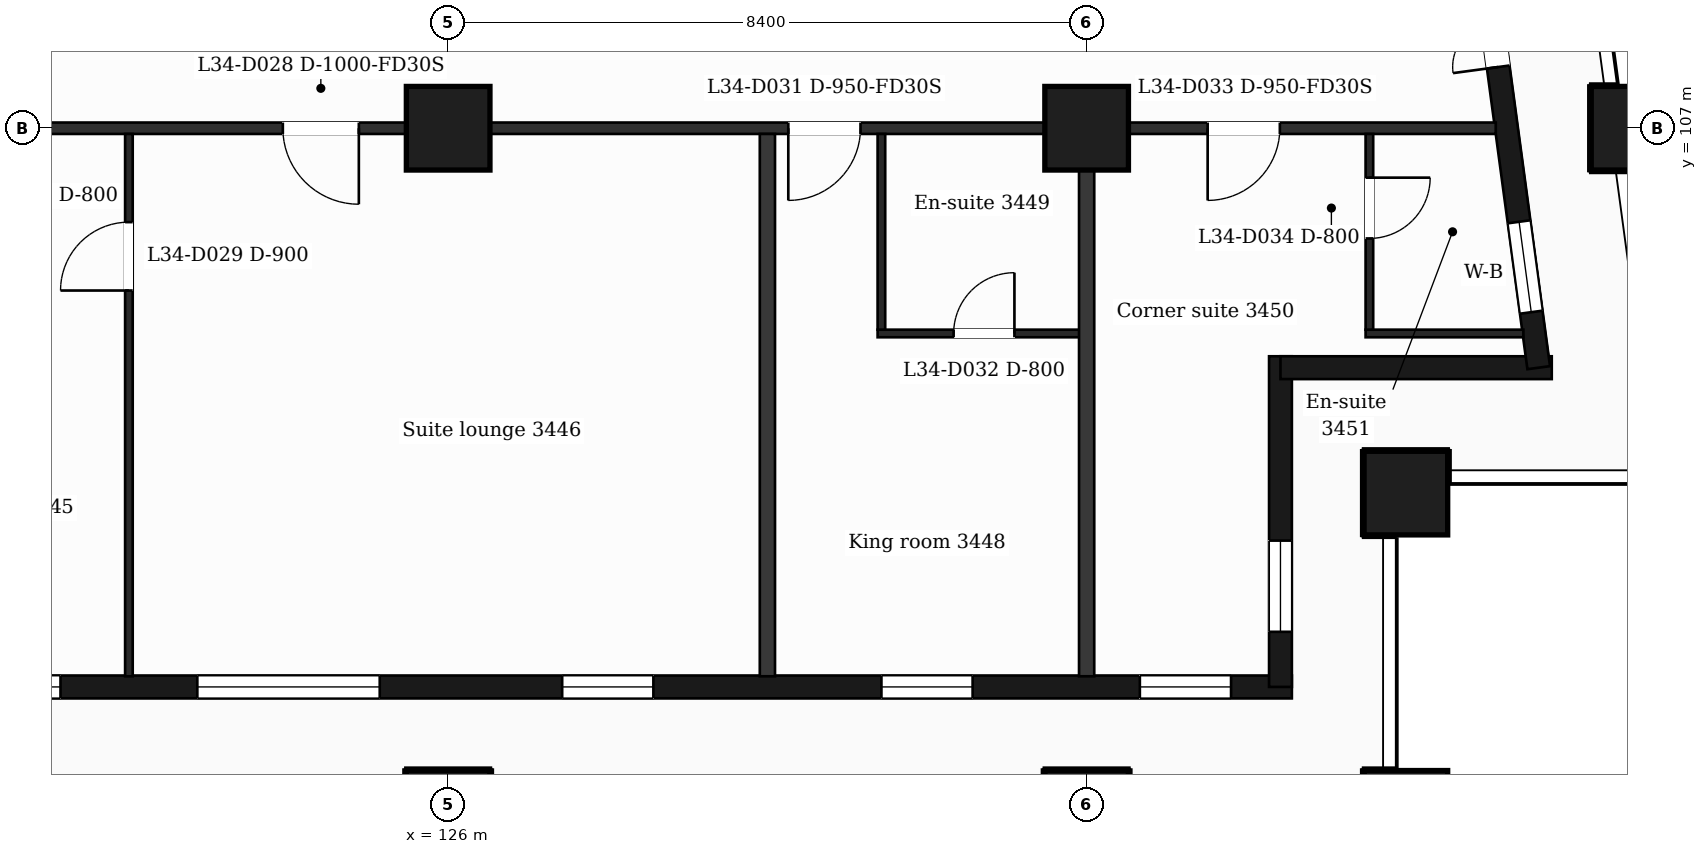
"""IFC4 building model, lengths in metres.
Left out: names, types, materials, properties, quantities, classifications, styles, units other than length and angle.
Written with IfcOpenShell. Run it as: python <this file> out.ifc"""

import sys

from ifc_helpers import new_model, si_unit, direction, frame, frame_2d, origin, origin_2d, place, context, subcontext, project, spatial, rectangle, extrude, element, fill, save


model = new_model("IFC4")
c1 = context("Model", 3, precision=1e-05, world=origin(), true_north=direction((0.0, 1.0)))
c2 = subcontext(c1, "Body", "Model", "MODEL_VIEW")
j1 = project(units=[si_unit("LENGTHUNIT", "METRE"), si_unit("PLANEANGLEUNIT", "RADIAN")], contexts=[c1])
p1 = place(None, origin())
s1 = spatial("IfcSite", under=j1, at=p1, CompositionType="ELEMENT")
p2 = place(p1, origin())
s2 = spatial("IfcBuilding", under=s1, at=p2, CompositionType="ELEMENT")
p3 = place(p2, frame((0.0, 0.0, 147.8)))
s3 = spatial("IfcBuildingStorey", under=s2, at=p3, CompositionType="ELEMENT", Elevation=147.8)
for number, where, z_axis, x_axis in (
    (1, (126.0, 98.0, 0.0), (0.0, 0.0, 1.0), (1.0, 0.0, 0.0)),
    (2, (134.4, 98.0, 0.0), (0.0, 0.0, 1.0), (1.0, 0.0, 0.0)),
    (3, (138.6, 98.0, 0.0), (0.0, 0.0, 1.0), (1.0, 0.0, 0.0)),
    (4, (138.6, 102.2, 0.0), (0.0, 0.0, 1.0), (1.0, 0.0, 0.0)),
    (5, (126.0, 107.0, 0.0), (0.0, 0.0, 1.0), (1.0, 0.0, 0.0)),
    (6, (134.4, 107.0, 0.0), (0.0, 0.0, 1.0), (1.0, 0.0, 0.0)),
    (7, (141.588, 107.0, 0.0), (0.0, 0.0, 1.0), (1.0, 0.0, 0.0)),
):
    element("IfcColumn", number, at=place(p3, frame(where, z_axis=z_axis, x_axis=x_axis)), inside=s3, PredefinedType="COLUMN", context=c2, shape_type="SweptSolid", body=[
        extrude(rectangle(XDim=1.1, YDim=1.1, at=origin_2d()), origin(), (0.0, 0.0, 1.0), 3.7),
    ])
p4 = place(p3, frame((89.85, 99.65, 0.0), z_axis=(0.0, 0.0, 1.0), x_axis=(1.0, 0.0, 0.0)))
e8 = element("IfcWall", 8, at=p4, inside=s3, PredefinedType="SOLIDWALL", context=c2, shape_type="SweptSolid", body=[
    extrude(rectangle(XDim=47.25, YDim=0.3, at=frame_2d((23.625, 0.0))), origin(), (0.0, 0.0, 1.0), 3.38),
])
p5 = place(p4, frame((0.725, 0.0, 0.9)))
e9 = element("IfcOpeningElement", 9, at=p5, cuts=e8, PredefinedType="OPENING", context=c2, shape_type="SweptSolid", body=[
    extrude(rectangle(XDim=1.2, YDim=2.1, at=frame_2d((0.6, 1.05))), frame((0.0, 0.16, 0.0), z_axis=(0.0, -1.0, 0.0), x_axis=(1.0, 0.0, 0.0)), (0.0, 0.0, 1.0), 0.32),
])
p6 = place(p4, frame((3.45, 0.0, 0.9)))
e10 = element("IfcOpeningElement", 10, at=p6, cuts=e8, PredefinedType="OPENING", context=c2, shape_type="SweptSolid", body=[
    extrude(rectangle(XDim=2.4, YDim=2.1, at=frame_2d((1.2, 1.05))), frame((0.0, 0.16, 0.0), z_axis=(0.0, -1.0, 0.0), x_axis=(1.0, 0.0, 0.0)), (0.0, 0.0, 1.0), 0.32),
])
p7 = place(p4, frame((8.25, 0.0, 0.9)))
e11 = element("IfcOpeningElement", 11, at=p7, cuts=e8, PredefinedType="OPENING", context=c2, shape_type="SweptSolid", body=[
    extrude(rectangle(XDim=1.2, YDim=2.1, at=frame_2d((0.6, 1.05))), frame((0.0, 0.16, 0.0), z_axis=(0.0, -1.0, 0.0), x_axis=(1.0, 0.0, 0.0)), (0.0, 0.0, 1.0), 0.32),
])
p8 = place(p4, frame((12.45, 0.0, 0.9)))
e12 = element("IfcOpeningElement", 12, at=p8, cuts=e8, PredefinedType="OPENING", context=c2, shape_type="SweptSolid", body=[
    extrude(rectangle(XDim=1.2, YDim=2.1, at=frame_2d((0.6, 1.05))), frame((0.0, 0.16, 0.0), z_axis=(0.0, -1.0, 0.0), x_axis=(1.0, 0.0, 0.0)), (0.0, 0.0, 1.0), 0.32),
])
p9 = place(p4, frame((16.05, 0.0, 0.9)))
e13 = element("IfcOpeningElement", 13, at=p9, cuts=e8, PredefinedType="OPENING", context=c2, shape_type="SweptSolid", body=[
    extrude(rectangle(XDim=2.4, YDim=2.1, at=frame_2d((1.2, 1.05))), frame((0.0, 0.16, 0.0), z_axis=(0.0, -1.0, 0.0), x_axis=(1.0, 0.0, 0.0)), (0.0, 0.0, 1.0), 0.32),
])
p10 = place(p4, frame((20.25, 0.0, 0.9)))
e14 = element("IfcOpeningElement", 14, at=p10, cuts=e8, PredefinedType="OPENING", context=c2, shape_type="SweptSolid", body=[
    extrude(rectangle(XDim=2.4, YDim=2.1, at=frame_2d((1.2, 1.05))), frame((0.0, 0.16, 0.0), z_axis=(0.0, -1.0, 0.0), x_axis=(1.0, 0.0, 0.0)), (0.0, 0.0, 1.0), 0.32),
])
p11 = place(p4, frame((25.05, 0.0, 0.0)))
e15 = element("IfcOpeningElement", 15, at=p11, cuts=e8, PredefinedType="OPENING", context=c2, shape_type="SweptSolid", body=[
    extrude(rectangle(XDim=1.2, YDim=2.4, at=frame_2d((0.6, 1.2))), frame((0.0, 0.16, 0.0), z_axis=(0.0, -1.0, 0.0), x_axis=(1.0, 0.0, 0.0)), (0.0, 0.0, 1.0), 0.32),
])
p12 = place(p4, frame((28.65, 0.0, 0.9)))
e16 = element("IfcOpeningElement", 16, at=p12, cuts=e8, PredefinedType="OPENING", context=c2, shape_type="SweptSolid", body=[
    extrude(rectangle(XDim=2.4, YDim=2.1, at=frame_2d((1.2, 1.05))), frame((0.0, 0.16, 0.0), z_axis=(0.0, -1.0, 0.0), x_axis=(1.0, 0.0, 0.0)), (0.0, 0.0, 1.0), 0.32),
])
p13 = place(p4, frame((32.85, 0.0, 0.9)))
e17 = element("IfcOpeningElement", 17, at=p13, cuts=e8, PredefinedType="OPENING", context=c2, shape_type="SweptSolid", body=[
    extrude(rectangle(XDim=2.4, YDim=2.1, at=frame_2d((1.2, 1.05))), frame((0.0, 0.16, 0.0), z_axis=(0.0, -1.0, 0.0), x_axis=(1.0, 0.0, 0.0)), (0.0, 0.0, 1.0), 0.32),
])
p14 = place(p4, frame((37.65, 0.0, 0.9)))
e18 = element("IfcOpeningElement", 18, at=p14, cuts=e8, PredefinedType="OPENING", context=c2, shape_type="SweptSolid", body=[
    extrude(rectangle(XDim=1.2, YDim=2.1, at=frame_2d((0.6, 1.05))), frame((0.0, 0.16, 0.0), z_axis=(0.0, -1.0, 0.0), x_axis=(1.0, 0.0, 0.0)), (0.0, 0.0, 1.0), 0.32),
])
p15 = place(p4, frame((41.85, 0.0, 0.9)))
e19 = element("IfcOpeningElement", 19, at=p15, cuts=e8, PredefinedType="OPENING", context=c2, shape_type="SweptSolid", body=[
    extrude(rectangle(XDim=1.2, YDim=2.1, at=frame_2d((0.6, 1.05))), frame((0.0, 0.16, 0.0), z_axis=(0.0, -1.0, 0.0), x_axis=(1.0, 0.0, 0.0)), (0.0, 0.0, 1.0), 0.32),
])
p16 = place(p4, frame((45.25, 0.0, 0.9)))
e20 = element("IfcOpeningElement", 20, at=p16, cuts=e8, PredefinedType="OPENING", context=c2, shape_type="SweptSolid", body=[
    extrude(rectangle(XDim=1.2, YDim=2.1, at=frame_2d((0.6, 1.05))), frame((0.0, 0.16, 0.0), z_axis=(0.0, -1.0, 0.0), x_axis=(1.0, 0.0, 0.0)), (0.0, 0.0, 1.0), 0.32),
])
p17 = place(p3, frame((136.95, 99.65, 0.0), z_axis=(0.0, 0.0, 1.0), x_axis=(0.0, 1.0, 0.0)))
e21 = element("IfcWall", 21, at=p17, inside=s3, PredefinedType="SOLIDWALL", context=c2, shape_type="SweptSolid", body=[
    extrude(rectangle(XDim=4.35, YDim=0.3, at=frame_2d((2.175, 0.0))), origin(), (0.0, 0.0, 1.0), 3.38),
])
p18 = place(p17, frame((0.725, 0.0, 0.9)))
e22 = element("IfcOpeningElement", 22, at=p18, cuts=e21, PredefinedType="OPENING", context=c2, shape_type="SweptSolid", body=[
    extrude(rectangle(XDim=1.2, YDim=2.1, at=frame_2d((0.6, 1.05))), frame((0.0, 0.16, 0.0), z_axis=(0.0, -1.0, 0.0), x_axis=(1.0, 0.0, 0.0)), (0.0, 0.0, 1.0), 0.32),
])
p19 = place(p3, frame((136.95, 103.85, 0.0), z_axis=(0.0, 0.0, 1.0), x_axis=(1.0, 0.0, 0.0)))
e23 = element("IfcWall", 23, at=p19, inside=s3, PredefinedType="SOLIDWALL", context=c2, shape_type="SweptSolid", body=[
    extrude(rectangle(XDim=3.569, YDim=0.3, at=frame_2d((1.785, 0.0))), origin(), (0.0, 0.0, 1.0), 3.38),
])
p20 = place(p3, frame((140.348, 103.85, 0.0), z_axis=(0.0, 0.0, 1.0), x_axis=(-0.133431549479, 0.991058031401, 0.0)))
e24 = element("IfcWall", 24, at=p20, inside=s3, PredefinedType="SOLIDWALL", context=c2, shape_type="SweptSolid", body=[
    extrude(rectangle(XDim=6.609, YDim=0.3, at=frame_2d((3.304, 0.0))), origin(), (0.0, 0.0, 1.0), 3.38),
])
p21 = place(p20, frame((0.737, 0.0, 0.9)))
e25 = element("IfcOpeningElement", 25, at=p21, cuts=e24, PredefinedType="OPENING", context=c2, shape_type="SweptSolid", body=[
    extrude(rectangle(XDim=1.2, YDim=2.1, at=frame_2d((0.6, 1.05))), frame((0.0, 0.16, 0.0), z_axis=(0.0, -1.0, 0.0), x_axis=(1.0, 0.0, 0.0)), (0.0, 0.0, 1.0), 0.32),
])
p22 = place(p20, frame((3.991, 0.0, 0.0)))
e26 = element("IfcOpeningElement", 26, at=p22, cuts=e24, PredefinedType="OPENING", context=c2, shape_type="SweptSolid", body=[
    extrude(rectangle(XDim=1.2, YDim=2.4, at=frame_2d((0.6, 1.2))), frame((0.0, 0.16, 0.0), z_axis=(0.0, -1.0, 0.0), x_axis=(1.0, 0.0, 0.0)), (0.0, 0.0, 1.0), 0.32),
])
p23 = place(p3, frame((131.65, 104.3, 0.0), z_axis=(0.0, 0.0, 1.0), x_axis=(1.0, 0.0, 0.0)))
e27 = element("IfcWall", 27, at=p23, inside=s3, PredefinedType="PARTITIONING", context=c2, shape_type="SweptSolid", body=[
    extrude(rectangle(XDim=2.75, YDim=0.1, at=frame_2d((1.375, 0.0))), origin(), (0.0, 0.0, 1.0), 3.38),
])
p24 = place(p23, frame((1.0, 0.0, 0.0)))
e28 = element("IfcOpeningElement", 28, at=p24, cuts=e27, PredefinedType="OPENING", context=c2, shape_type="SweptSolid", body=[
    extrude(rectangle(XDim=0.8, YDim=2.1, at=frame_2d((0.4, 1.05))), frame((0.0, 0.06, 0.0), z_axis=(0.0, -1.0, 0.0), x_axis=(1.0, 0.0, 0.0)), (0.0, 0.0, 1.0), 0.12),
])
p25 = place(p3, frame((138.07, 104.3, 0.0), z_axis=(0.0, 0.0, 1.0), x_axis=(1.0, 0.0, 0.0)))
e29 = element("IfcWall", 29, at=p25, inside=s3, PredefinedType="PARTITIONING", context=c2, shape_type="SweptSolid", body=[
    extrude(rectangle(XDim=2.076, YDim=0.1, at=frame_2d((1.038, 0.0))), origin(), (0.0, 0.0, 1.0), 3.38),
])
p26 = place(p3, frame((87.018, 107.0, 0.0), z_axis=(0.0, 0.0, 1.0), x_axis=(1.0, 0.0, 0.0)))
e30 = element("IfcWall", 30, at=p26, inside=s3, PredefinedType="PARTITIONING", context=c2, shape_type="SweptSolid", body=[
    extrude(rectangle(XDim=52.765, YDim=0.15, at=frame_2d((26.382, 0.0))), origin(), (0.0, 0.0, 1.0), 3.38),
])
p27 = place(p26, frame((0.707, 0.0, 0.0)))
e31 = element("IfcOpeningElement", 31, at=p27, cuts=e30, PredefinedType="OPENING", context=c2, shape_type="SweptSolid", body=[
    extrude(rectangle(XDim=0.95, YDim=2.1, at=frame_2d((0.475, 1.05))), frame((0.0, 0.085, 0.0), z_axis=(0.0, -1.0, 0.0), x_axis=(1.0, 0.0, 0.0)), (0.0, 0.0, 1.0), 0.17),
])
p28 = place(p26, frame((7.645, 0.0, 0.0)))
e32 = element("IfcOpeningElement", 32, at=p28, cuts=e30, PredefinedType="OPENING", context=c2, shape_type="SweptSolid", body=[
    extrude(rectangle(XDim=0.95, YDim=2.1, at=frame_2d((0.475, 1.05))), frame((0.0, 0.085, 0.0), z_axis=(0.0, -1.0, 0.0), x_axis=(1.0, 0.0, 0.0)), (0.0, 0.0, 1.0), 0.17),
])
p29 = place(p26, frame((12.067, 0.0, 0.0)))
e33 = element("IfcOpeningElement", 33, at=p29, cuts=e30, PredefinedType="OPENING", context=c2, shape_type="SweptSolid", body=[
    extrude(rectangle(XDim=0.95, YDim=2.1, at=frame_2d((0.475, 1.05))), frame((0.0, 0.085, 0.0), z_axis=(0.0, -1.0, 0.0), x_axis=(1.0, 0.0, 0.0)), (0.0, 0.0, 1.0), 0.17),
])
p30 = place(p26, frame((14.582, 0.0, 0.0)))
e34 = element("IfcOpeningElement", 34, at=p30, cuts=e30, PredefinedType="OPENING", context=c2, shape_type="SweptSolid", body=[
    extrude(rectangle(XDim=0.95, YDim=2.1, at=frame_2d((0.475, 1.05))), frame((0.0, 0.085, 0.0), z_axis=(0.0, -1.0, 0.0), x_axis=(1.0, 0.0, 0.0)), (0.0, 0.0, 1.0), 0.17),
])
p31 = place(p26, frame((20.432, 0.0, 0.0)))
e35 = element("IfcOpeningElement", 35, at=p31, cuts=e30, PredefinedType="OPENING", context=c2, shape_type="SweptSolid", body=[
    extrude(rectangle(XDim=0.95, YDim=2.1, at=frame_2d((0.475, 1.05))), frame((0.0, 0.085, 0.0), z_axis=(0.0, -1.0, 0.0), x_axis=(1.0, 0.0, 0.0)), (0.0, 0.0, 1.0), 0.17),
])
p32 = place(p26, frame((23.532, 0.0, 0.0)))
e36 = element("IfcOpeningElement", 36, at=p32, cuts=e30, PredefinedType="OPENING", context=c2, shape_type="SweptSolid", body=[
    extrude(rectangle(XDim=1.0, YDim=2.1, at=frame_2d((0.5, 1.05))), frame((0.0, 0.085, 0.0), z_axis=(0.0, -1.0, 0.0), x_axis=(1.0, 0.0, 0.0)), (0.0, 0.0, 1.0), 0.17),
])
p33 = place(p26, frame((36.807, 0.0, 0.0)))
e37 = element("IfcOpeningElement", 37, at=p33, cuts=e30, PredefinedType="OPENING", context=c2, shape_type="SweptSolid", body=[
    extrude(rectangle(XDim=1.0, YDim=2.1, at=frame_2d((0.5, 1.05))), frame((0.0, 0.085, 0.0), z_axis=(0.0, -1.0, 0.0), x_axis=(1.0, 0.0, 0.0)), (0.0, 0.0, 1.0), 0.17),
])
p34 = place(p26, frame((43.457, 0.0, 0.0)))
e38 = element("IfcOpeningElement", 38, at=p34, cuts=e30, PredefinedType="OPENING", context=c2, shape_type="SweptSolid", body=[
    extrude(rectangle(XDim=0.95, YDim=2.1, at=frame_2d((0.475, 1.05))), frame((0.0, 0.085, 0.0), z_axis=(0.0, -1.0, 0.0), x_axis=(1.0, 0.0, 0.0)), (0.0, 0.0, 1.0), 0.17),
])
p35 = place(p26, frame((48.974, 0.0, 0.0)))
e39 = element("IfcOpeningElement", 39, at=p35, cuts=e30, PredefinedType="OPENING", context=c2, shape_type="SweptSolid", body=[
    extrude(rectangle(XDim=0.95, YDim=2.1, at=frame_2d((0.475, 1.05))), frame((0.0, 0.085, 0.0), z_axis=(0.0, -1.0, 0.0), x_axis=(1.0, 0.0, 0.0)), (0.0, 0.0, 1.0), 0.17),
])
p36 = place(p3, frame((121.8, 99.79, 0.0), z_axis=(0.0, 0.0, 1.0), x_axis=(0.0, 1.0, 0.0)))
e40 = element("IfcWall", 40, at=p36, inside=s3, PredefinedType="PARTITIONING", context=c2, shape_type="SweptSolid", body=[
    extrude(rectangle(XDim=7.135, YDim=0.1, at=frame_2d((3.567, 0.0))), origin(), (0.0, 0.0, 1.0), 3.38),
])
p37 = place(p36, frame((5.075, 0.0, 0.0)))
e41 = element("IfcOpeningElement", 41, at=p37, cuts=e40, PredefinedType="OPENING", context=c2, shape_type="SweptSolid", body=[
    extrude(rectangle(XDim=0.9, YDim=2.1, at=frame_2d((0.45, 1.05))), frame((0.0, 0.06, 0.0), z_axis=(0.0, -1.0, 0.0), x_axis=(1.0, 0.0, 0.0)), (0.0, 0.0, 1.0), 0.12),
])
p38 = place(p3, frame((130.2, 99.79, 0.0), z_axis=(0.0, 0.0, 1.0), x_axis=(0.0, 1.0, 0.0)))
e42 = element("IfcWall", 42, at=p38, inside=s3, PredefinedType="PARTITIONING", context=c2, shape_type="SweptSolid", body=[
    extrude(rectangle(XDim=7.135, YDim=0.2, at=frame_2d((3.567, 0.0))), origin(), (0.0, 0.0, 1.0), 3.38),
])
p39 = place(p3, frame((131.7, 104.35, 0.0), z_axis=(0.0, 0.0, 1.0), x_axis=(0.0, 1.0, 0.0)))
e43 = element("IfcWall", 43, at=p39, inside=s3, PredefinedType="PARTITIONING", context=c2, shape_type="SweptSolid", body=[
    extrude(rectangle(XDim=2.575, YDim=0.1, at=frame_2d((1.288, 0.0))), origin(), (0.0, 0.0, 1.0), 3.38),
])
p40 = place(p3, frame((134.4, 99.79, 0.0), z_axis=(0.0, 0.0, 1.0), x_axis=(0.0, 1.0, 0.0)))
e44 = element("IfcWall", 44, at=p40, inside=s3, PredefinedType="PARTITIONING", context=c2, shape_type="SweptSolid", body=[
    extrude(rectangle(XDim=7.135, YDim=0.2, at=frame_2d((3.567, 0.0))), origin(), (0.0, 0.0, 1.0), 3.38),
])
p41 = place(p3, frame((138.12, 104.35, 0.0), z_axis=(0.0, 0.0, 1.0), x_axis=(0.0, 1.0, 0.0)))
e45 = element("IfcWall", 45, at=p41, inside=s3, PredefinedType="PARTITIONING", context=c2, shape_type="SweptSolid", body=[
    extrude(rectangle(XDim=2.575, YDim=0.1, at=frame_2d((1.288, 0.0))), origin(), (0.0, 0.0, 1.0), 3.38),
])
p42 = place(p41, frame((1.2, 0.0, 0.0)))
e46 = element("IfcOpeningElement", 46, at=p42, cuts=e45, PredefinedType="OPENING", context=c2, shape_type="SweptSolid", body=[
    extrude(rectangle(XDim=0.8, YDim=2.1, at=frame_2d((0.4, 1.05))), frame((0.0, 0.06, 0.0), z_axis=(0.0, -1.0, 0.0), x_axis=(1.0, 0.0, 0.0)), (0.0, 0.0, 1.0), 0.12),
])
p43 = place(p12, origin())
e47 = element("IfcWindow", 47, at=p43, inside=s3, PartitioningType="SINGLE_PANEL", PredefinedType="WINDOW", context=c2, shape_type="SweptSolid", body=[
    extrude(rectangle(XDim=2.4, YDim=2.1, at=frame_2d((1.2, 1.05))), frame((0.0, 0.03, 0.0), z_axis=(0.0, -1.0, 0.0), x_axis=(1.0, 0.0, 0.0)), (0.0, 0.0, 1.0), 0.06),
])
fill(e16, e47)
p44 = place(p13, origin())
e48 = element("IfcWindow", 48, at=p44, inside=s3, PartitioningType="SINGLE_PANEL", PredefinedType="WINDOW", context=c2, shape_type="SweptSolid", body=[
    extrude(rectangle(XDim=2.4, YDim=2.1, at=frame_2d((1.2, 1.05))), frame((0.0, 0.03, 0.0), z_axis=(0.0, -1.0, 0.0), x_axis=(1.0, 0.0, 0.0)), (0.0, 0.0, 1.0), 0.06),
])
fill(e17, e48)
p45 = place(p14, origin())
e49 = element("IfcWindow", 49, at=p45, inside=s3, PartitioningType="SINGLE_PANEL", PredefinedType="WINDOW", context=c2, shape_type="SweptSolid", body=[
    extrude(rectangle(XDim=1.2, YDim=2.1, at=frame_2d((0.6, 1.05))), frame((0.0, 0.03, 0.0), z_axis=(0.0, -1.0, 0.0), x_axis=(1.0, 0.0, 0.0)), (0.0, 0.0, 1.0), 0.06),
])
fill(e18, e49)
p46 = place(p15, origin())
e50 = element("IfcWindow", 50, at=p46, inside=s3, PartitioningType="SINGLE_PANEL", PredefinedType="WINDOW", context=c2, shape_type="SweptSolid", body=[
    extrude(rectangle(XDim=1.2, YDim=2.1, at=frame_2d((0.6, 1.05))), frame((0.0, 0.03, 0.0), z_axis=(0.0, -1.0, 0.0), x_axis=(1.0, 0.0, 0.0)), (0.0, 0.0, 1.0), 0.06),
])
fill(e19, e50)
p47 = place(p16, origin())
e51 = element("IfcWindow", 51, at=p47, inside=s3, PartitioningType="SINGLE_PANEL", PredefinedType="WINDOW", context=c2, shape_type="SweptSolid", body=[
    extrude(rectangle(XDim=1.2, YDim=2.1, at=frame_2d((0.6, 1.05))), frame((0.0, 0.03, 0.0), z_axis=(0.0, -1.0, 0.0), x_axis=(1.0, 0.0, 0.0)), (0.0, 0.0, 1.0), 0.06),
])
fill(e20, e51)
p48 = place(p18, origin())
e52 = element("IfcWindow", 52, at=p48, inside=s3, PartitioningType="SINGLE_PANEL", PredefinedType="WINDOW", context=c2, shape_type="SweptSolid", body=[
    extrude(rectangle(XDim=1.2, YDim=2.1, at=frame_2d((0.6, 1.05))), frame((0.0, 0.03, 0.0), z_axis=(0.0, -1.0, 0.0), x_axis=(1.0, 0.0, 0.0)), (0.0, 0.0, 1.0), 0.06),
])
fill(e22, e52)
p49 = place(p21, origin())
e53 = element("IfcWindow", 53, at=p49, inside=s3, PartitioningType="SINGLE_PANEL", PredefinedType="WINDOW", context=c2, shape_type="SweptSolid", body=[
    extrude(rectangle(XDim=1.2, YDim=2.1, at=frame_2d((0.6, 1.05))), frame((0.0, 0.03, 0.0), z_axis=(0.0, -1.0, 0.0), x_axis=(1.0, 0.0, 0.0)), (0.0, 0.0, 1.0), 0.06),
])
fill(e25, e53)
p50 = place(p22, origin())
e54 = element("IfcDoor", 54, at=p50, inside=s3, OperationType="DOUBLE_DOOR_SINGLE_SWING", PredefinedType="DOOR", context=c2, shape_type="SweptSolid", body=[
    extrude(rectangle(XDim=1.2, YDim=2.4, at=frame_2d((0.6, 1.2))), frame((0.0, 0.025, 0.0), z_axis=(0.0, -1.0, 0.0), x_axis=(1.0, 0.0, 0.0)), (0.0, 0.0, 1.0), 0.05),
])
fill(e26, e54)
p51 = place(p33, origin())
e55 = element("IfcDoor", 55, at=p51, inside=s3, OperationType="SINGLE_SWING_RIGHT", PredefinedType="DOOR", context=c2, shape_type="SweptSolid", body=[
    extrude(rectangle(XDim=1.0, YDim=2.1, at=frame_2d((0.5, 1.05))), frame((0.0, 0.025, 0.0), z_axis=(0.0, -1.0, 0.0), x_axis=(1.0, 0.0, 0.0)), (0.0, 0.0, 1.0), 0.05),
])
fill(e37, e55)
p52 = place(p37, origin())
e56 = element("IfcDoor", 56, at=p52, inside=s3, OperationType="SINGLE_SWING_LEFT", PredefinedType="DOOR", context=c2, shape_type="SweptSolid", body=[
    extrude(rectangle(XDim=0.9, YDim=2.1, at=frame_2d((0.45, 1.05))), frame((0.0, 0.025, 0.0), z_axis=(0.0, -1.0, 0.0), x_axis=(1.0, 0.0, 0.0)), (0.0, 0.0, 1.0), 0.05),
])
fill(e41, e56)
p53 = place(p34, origin())
e57 = element("IfcDoor", 57, at=p53, inside=s3, OperationType="SINGLE_SWING_LEFT", PredefinedType="DOOR", context=c2, shape_type="SweptSolid", body=[
    extrude(rectangle(XDim=0.95, YDim=2.1, at=frame_2d((0.475, 1.05))), frame((0.0, 0.025, 0.0), z_axis=(0.0, -1.0, 0.0), x_axis=(1.0, 0.0, 0.0)), (0.0, 0.0, 1.0), 0.05),
])
fill(e38, e57)
p54 = place(p24, origin())
e58 = element("IfcDoor", 58, at=p54, inside=s3, OperationType="SINGLE_SWING_RIGHT", PredefinedType="DOOR", context=c2, shape_type="SweptSolid", body=[
    extrude(rectangle(XDim=0.8, YDim=2.1, at=frame_2d((0.4, 1.05))), frame((0.0, 0.025, 0.0), z_axis=(0.0, -1.0, 0.0), x_axis=(1.0, 0.0, 0.0)), (0.0, 0.0, 1.0), 0.05),
])
fill(e28, e58)
p55 = place(p35, origin())
e59 = element("IfcDoor", 59, at=p55, inside=s3, OperationType="SINGLE_SWING_LEFT", PredefinedType="DOOR", context=c2, shape_type="SweptSolid", body=[
    extrude(rectangle(XDim=0.95, YDim=2.1, at=frame_2d((0.475, 1.05))), frame((0.0, 0.025, 0.0), z_axis=(0.0, -1.0, 0.0), x_axis=(1.0, 0.0, 0.0)), (0.0, 0.0, 1.0), 0.05),
])
fill(e39, e59)
p56 = place(p42, origin())
e60 = element("IfcDoor", 60, at=p56, inside=s3, OperationType="SINGLE_SWING_RIGHT", PredefinedType="DOOR", context=c2, shape_type="SweptSolid", body=[
    extrude(rectangle(XDim=0.8, YDim=2.1, at=frame_2d((0.4, 1.05))), frame((0.0, 0.025, 0.0), z_axis=(0.0, -1.0, 0.0), x_axis=(1.0, 0.0, 0.0)), (0.0, 0.0, 1.0), 0.05),
])
fill(e46, e60)
save(model, sys.argv[1])
